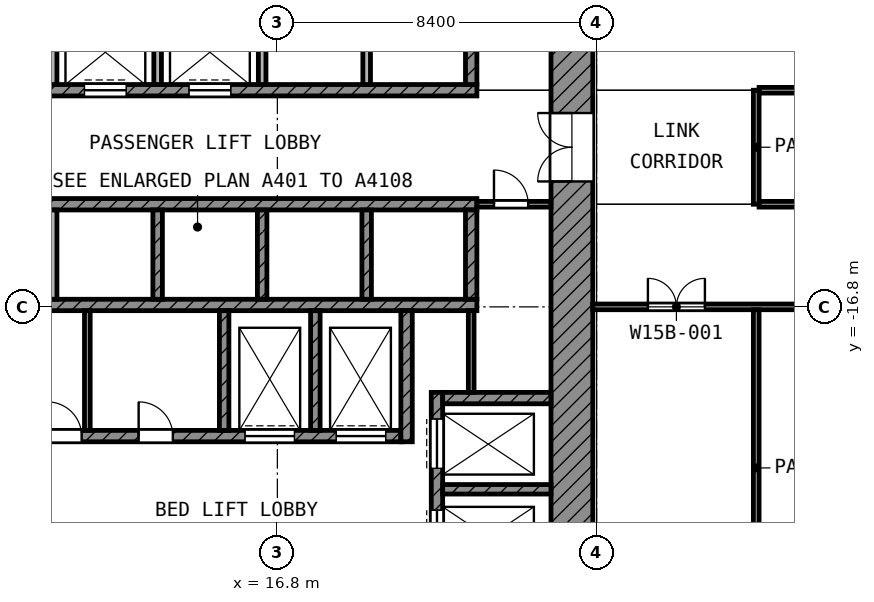
"""IFC4 building model, lengths in metres.
Left out: names, types, materials, properties, quantities, classifications, styles, units other than length and angle.
Written with IfcOpenShell. Run it as: python <this file> out.ifc"""

import sys

from ifc_helpers import new_model, si_unit, direction, frame, frame_2d, origin, place, context, subcontext, project, spatial, rectangle, extrude, element, fill, save


model = new_model("IFC4")
c1 = context("Model", 3, precision=1e-05, world=origin(), true_north=direction((0.0, 1.0)))
c2 = subcontext(c1, "Body", "Model", "MODEL_VIEW")
j1 = project(units=[si_unit("LENGTHUNIT", "METRE"), si_unit("PLANEANGLEUNIT", "RADIAN")], contexts=[c1])
p1 = place(None, origin())
s1 = spatial("IfcSite", under=j1, at=p1, CompositionType="ELEMENT")
p2 = place(p1, origin())
s2 = spatial("IfcBuilding", under=s1, at=p2, CompositionType="ELEMENT")
p3 = place(p2, frame((0.0, 0.0, 85.4)))
s3 = spatial("IfcBuildingStorey", under=s2, at=p3, CompositionType="ELEMENT", Elevation=85.4)
p4 = place(p3, frame((24.55, -24.0, 0.0), z_axis=(0.0, 0.0, 1.0), x_axis=(0.0, 1.0, 0.0)))
e1 = element("IfcWall", 1, at=p4, inside=s3, PredefinedType="SHEAR", context=c2, shape_type="SweptSolid", body=[
    extrude(rectangle(XDim=18.6, YDim=1.1, at=frame_2d((9.3, 0.0))), origin(), (0.0, 0.0, 1.0), 3.9),
])
p5 = place(p4, frame((10.5, 0.0, 0.0)))
e2 = element("IfcOpeningElement", 2, at=p5, cuts=e1, PredefinedType="OPENING", context=c2, shape_type="SweptSolid", body=[
    extrude(rectangle(XDim=1.8, YDim=2.1, at=frame_2d((0.9, 1.05))), frame((0.0, 0.56, 0.0), z_axis=(0.0, -1.0, 0.0), x_axis=(1.0, 0.0, 0.0)), (0.0, 0.0, 1.0), 1.12),
])
p6 = place(p3, frame((5.4, -11.1, 0.0), z_axis=(0.0, 0.0, 1.0), x_axis=(1.0, 0.0, 0.0)))
e3 = element("IfcWall", 3, at=p6, inside=s3, PredefinedType="SHEAR", context=c2, shape_type="SweptSolid", body=[
    extrude(rectangle(XDim=16.65, YDim=0.3, at=frame_2d((8.325, 0.0))), origin(), (0.0, 0.0, 1.0), 3.9),
])
p7 = place(p6, frame((0.825, 0.0, 0.0)))
e4 = element("IfcOpeningElement", 4, at=p7, cuts=e3, PredefinedType="OPENING", context=c2, shape_type="SweptSolid", body=[
    extrude(rectangle(XDim=1.1, YDim=2.1, at=frame_2d((0.55, 1.05))), frame((0.0, 0.16, 0.0), z_axis=(0.0, -1.0, 0.0), x_axis=(1.0, 0.0, 0.0)), (0.0, 0.0, 1.0), 0.32),
])
p8 = place(p6, frame((3.575, 0.0, 0.0)))
e5 = element("IfcOpeningElement", 5, at=p8, cuts=e3, PredefinedType="OPENING", context=c2, shape_type="SweptSolid", body=[
    extrude(rectangle(XDim=1.1, YDim=2.1, at=frame_2d((0.55, 1.05))), frame((0.0, 0.16, 0.0), z_axis=(0.0, -1.0, 0.0), x_axis=(1.0, 0.0, 0.0)), (0.0, 0.0, 1.0), 0.32),
])
p9 = place(p6, frame((6.325, 0.0, 0.0)))
e6 = element("IfcOpeningElement", 6, at=p9, cuts=e3, PredefinedType="OPENING", context=c2, shape_type="SweptSolid", body=[
    extrude(rectangle(XDim=1.1, YDim=2.1, at=frame_2d((0.55, 1.05))), frame((0.0, 0.16, 0.0), z_axis=(0.0, -1.0, 0.0), x_axis=(1.0, 0.0, 0.0)), (0.0, 0.0, 1.0), 0.32),
])
p10 = place(p6, frame((9.075, 0.0, 0.0)))
e7 = element("IfcOpeningElement", 7, at=p10, cuts=e3, PredefinedType="OPENING", context=c2, shape_type="SweptSolid", body=[
    extrude(rectangle(XDim=1.1, YDim=2.1, at=frame_2d((0.55, 1.05))), frame((0.0, 0.16, 0.0), z_axis=(0.0, -1.0, 0.0), x_axis=(1.0, 0.0, 0.0)), (0.0, 0.0, 1.0), 0.32),
])
for number, where, z_axis, x_axis in (
    (8, (5.4, -14.1, 0.0), (0.0, 0.0, 1.0), (1.0, 0.0, 0.0)),
    (9, (5.4, -16.75, 0.0), (0.0, 0.0, 1.0), (1.0, 0.0, 0.0)),
):
    element("IfcWall", number, at=place(p3, frame(where, z_axis=z_axis, x_axis=x_axis)), inside=s3, PredefinedType="SHEAR", context=c2, shape_type="SweptSolid", body=[
        extrude(rectangle(XDim=16.65, YDim=0.3, at=frame_2d((8.325, 0.0))), origin(), (0.0, 0.0, 1.0), 3.9),
    ])
p11 = place(p3, frame((5.4, -20.2, 0.0), z_axis=(0.0, 0.0, 1.0), x_axis=(1.0, 0.0, 0.0)))
e10 = element("IfcWall", 10, at=p11, inside=s3, PredefinedType="SHEAR", context=c2, shape_type="SweptSolid", body=[
    extrude(rectangle(XDim=14.65, YDim=0.3, at=frame_2d((7.325, 0.0))), origin(), (0.0, 0.0, 1.0), 3.9),
])
p12 = place(p11, frame((10.55, 0.0, 0.0)))
e11 = element("IfcOpeningElement", 11, at=p12, cuts=e10, PredefinedType="OPENING", context=c2, shape_type="SweptSolid", body=[
    extrude(rectangle(XDim=1.3, YDim=2.1, at=frame_2d((0.65, 1.05))), frame((0.0, 0.16, 0.0), z_axis=(0.0, -1.0, 0.0), x_axis=(1.0, 0.0, 0.0)), (0.0, 0.0, 1.0), 0.32),
])
p13 = place(p11, frame((12.95, 0.0, 0.0)))
e12 = element("IfcOpeningElement", 12, at=p13, cuts=e10, PredefinedType="OPENING", context=c2, shape_type="SweptSolid", body=[
    extrude(rectangle(XDim=1.3, YDim=2.1, at=frame_2d((0.65, 1.05))), frame((0.0, 0.16, 0.0), z_axis=(0.0, -1.0, 0.0), x_axis=(1.0, 0.0, 0.0)), (0.0, 0.0, 1.0), 0.32),
])
p14 = place(p11, frame((0.55, 0.0, 0.0)))
e13 = element("IfcOpeningElement", 13, at=p14, cuts=e10, PredefinedType="OPENING", context=c2, shape_type="SweptSolid", body=[
    extrude(rectangle(XDim=1.3, YDim=2.1, at=frame_2d((0.65, 1.05))), frame((0.0, 0.16, 0.0), z_axis=(0.0, -1.0, 0.0), x_axis=(1.0, 0.0, 0.0)), (0.0, 0.0, 1.0), 0.32),
])
p15 = place(p11, frame((2.95, 0.0, 0.0)))
e14 = element("IfcOpeningElement", 14, at=p15, cuts=e10, PredefinedType="OPENING", context=c2, shape_type="SweptSolid", body=[
    extrude(rectangle(XDim=1.3, YDim=2.1, at=frame_2d((0.65, 1.05))), frame((0.0, 0.16, 0.0), z_axis=(0.0, -1.0, 0.0), x_axis=(1.0, 0.0, 0.0)), (0.0, 0.0, 1.0), 0.32),
])
p16 = place(p11, frame((5.35, 0.0, 0.0)))
e15 = element("IfcOpeningElement", 15, at=p16, cuts=e10, PredefinedType="OPENING", context=c2, shape_type="SweptSolid", body=[
    extrude(rectangle(XDim=0.9, YDim=2.1, at=frame_2d((0.45, 1.05))), frame((0.0, 0.16, 0.0), z_axis=(0.0, -1.0, 0.0), x_axis=(1.0, 0.0, 0.0)), (0.0, 0.0, 1.0), 0.32),
])
p17 = place(p11, frame((7.75, 0.0, 0.0)))
e16 = element("IfcOpeningElement", 16, at=p17, cuts=e10, PredefinedType="OPENING", context=c2, shape_type="SweptSolid", body=[
    extrude(rectangle(XDim=0.9, YDim=2.1, at=frame_2d((0.45, 1.05))), frame((0.0, 0.16, 0.0), z_axis=(0.0, -1.0, 0.0), x_axis=(1.0, 0.0, 0.0)), (0.0, 0.0, 1.0), 0.32),
])
p18 = place(p3, frame((20.2, -20.35, 0.0), z_axis=(0.0, 0.0, 1.0), x_axis=(0.0, 1.0, 0.0)))
e17 = element("IfcWall", 17, at=p18, inside=s3, PredefinedType="SHEAR", context=c2, shape_type="SweptSolid", body=[
    extrude(rectangle(XDim=3.45, YDim=0.3, at=frame_2d((1.725, 0.0))), origin(), (0.0, 0.0, 1.0), 3.9),
])
p19 = place(p3, frame((21.9, -10.95, 0.0), z_axis=(0.0, 0.0, 1.0), x_axis=(0.0, 1.0, 0.0)))
e18 = element("IfcWall", 18, at=p19, inside=s3, PredefinedType="SHEAR", context=c2, shape_type="SweptSolid", body=[
    extrude(rectangle(XDim=2.35, YDim=0.3, at=frame_2d((1.175, 0.0))), origin(), (0.0, 0.0, 1.0), 3.9),
])
p20 = place(p3, frame((21.9, -16.6, 0.0), z_axis=(0.0, 0.0, 1.0), x_axis=(0.0, 1.0, 0.0)))
e19 = element("IfcWall", 19, at=p20, inside=s3, PredefinedType="SHEAR", context=c2, shape_type="SweptSolid", body=[
    extrude(rectangle(XDim=2.35, YDim=0.3, at=frame_2d((1.175, 0.0))), origin(), (0.0, 0.0, 1.0), 3.9),
])
p21 = place(p3, frame((21.15, -19.2, 0.0), z_axis=(0.0, 0.0, 1.0), x_axis=(1.0, 0.0, 0.0)))
e20 = element("IfcWall", 20, at=p21, inside=s3, PredefinedType="SHEAR", context=c2, shape_type="SweptSolid", body=[
    extrude(rectangle(XDim=2.85, YDim=0.3, at=frame_2d((1.425, 0.0))), origin(), (0.0, 0.0, 1.0), 3.9),
])
p22 = place(p3, frame((21.0, -24.0, 0.0), z_axis=(0.0, 0.0, 1.0), x_axis=(0.0, 1.0, 0.0)))
e21 = element("IfcWall", 21, at=p22, inside=s3, PredefinedType="SHEAR", context=c2, shape_type="SweptSolid", body=[
    extrude(rectangle(XDim=4.95, YDim=0.3, at=frame_2d((2.475, 0.0))), origin(), (0.0, 0.0, 1.0), 3.9),
])
p23 = place(p22, frame((2.95, 0.0, 0.0)))
e22 = element("IfcOpeningElement", 22, at=p23, cuts=e21, PredefinedType="OPENING", context=c2, shape_type="SweptSolid", body=[
    extrude(rectangle(XDim=1.3, YDim=2.1, at=frame_2d((0.65, 1.05))), frame((0.0, 0.16, 0.0), z_axis=(0.0, -1.0, 0.0), x_axis=(1.0, 0.0, 0.0)), (0.0, 0.0, 1.0), 0.32),
])
p24 = place(p22, frame((0.55, 0.0, 0.0)))
e23 = element("IfcOpeningElement", 23, at=p24, cuts=e21, PredefinedType="OPENING", context=c2, shape_type="SweptSolid", body=[
    extrude(rectangle(XDim=1.3, YDim=2.1, at=frame_2d((0.65, 1.05))), frame((0.0, 0.16, 0.0), z_axis=(0.0, -1.0, 0.0), x_axis=(1.0, 0.0, 0.0)), (0.0, 0.0, 1.0), 0.32),
])
p25 = place(p3, frame((21.15, -21.6, 0.0), z_axis=(0.0, 0.0, 1.0), x_axis=(1.0, 0.0, 0.0)))
e24 = element("IfcWall", 24, at=p25, inside=s3, PredefinedType="SHEAR", context=c2, shape_type="SweptSolid", body=[
    extrude(rectangle(XDim=2.85, YDim=0.25, at=frame_2d((1.425, 0.0))), origin(), (0.0, 0.0, 1.0), 3.9),
])
for number, where, z_axis, x_axis in (
    (25, (15.4, -20.05, 0.0), (0.0, 0.0, 1.0), (0.0, 1.0, 0.0)),
    (26, (17.8, -20.05, 0.0), (0.0, 0.0, 1.0), (0.0, 1.0, 0.0)),
):
    element("IfcWall", number, at=place(p3, frame(where, z_axis=z_axis, x_axis=x_axis)), inside=s3, PredefinedType="SHEAR", context=c2, shape_type="SweptSolid", body=[
        extrude(rectangle(XDim=3.15, YDim=0.25, at=frame_2d((1.575, 0.0))), origin(), (0.0, 0.0, 1.0), 3.9),
    ])
for number, where, z_axis, x_axis in (
    (27, (10.9, -10.95, 0.0), (0.0, 0.0, 1.0), (0.0, 1.0, 0.0)),
    (28, (13.65, -10.95, 0.0), (0.0, 0.0, 1.0), (0.0, 1.0, 0.0)),
    (29, (16.4, -10.95, 0.0), (0.0, 0.0, 1.0), (0.0, 1.0, 0.0)),
    (30, (19.15, -10.95, 0.0), (0.0, 0.0, 1.0), (0.0, 1.0, 0.0)),
):
    element("IfcWall", number, at=place(p3, frame(where, z_axis=z_axis, x_axis=x_axis)), inside=s3, PredefinedType="PARTITIONING", context=c2, shape_type="SweptSolid", body=[
        extrude(rectangle(XDim=2.35, YDim=0.2, at=frame_2d((1.175, 0.0))), origin(), (0.0, 0.0, 1.0), 3.9),
    ])
p26 = place(p3, frame((10.9, -16.6, 0.0), z_axis=(0.0, 0.0, 1.0), x_axis=(0.0, 1.0, 0.0)))
e31 = element("IfcWall", 31, at=p26, inside=s3, PredefinedType="PARTITIONING", context=c2, shape_type="SweptSolid", body=[
    extrude(rectangle(XDim=2.35, YDim=0.2, at=frame_2d((1.175, 0.0))), origin(), (0.0, 0.0, 1.0), 3.9),
])
for number, where, z_axis, x_axis in (
    (32, (13.65, -16.6, 0.0), (0.0, 0.0, 1.0), (0.0, 1.0, 0.0)),
    (33, (16.4, -16.6, 0.0), (0.0, 0.0, 1.0), (0.0, 1.0, 0.0)),
    (34, (19.15, -16.6, 0.0), (0.0, 0.0, 1.0), (0.0, 1.0, 0.0)),
):
    element("IfcWall", number, at=place(p3, frame(where, z_axis=z_axis, x_axis=x_axis)), inside=s3, PredefinedType="SHEAR", context=c2, shape_type="SweptSolid", body=[
        extrude(rectangle(XDim=2.35, YDim=0.25, at=frame_2d((1.175, 0.0))), origin(), (0.0, 0.0, 1.0), 3.9),
    ])
p27 = place(p3, frame((21.9, -19.05, 0.0), z_axis=(0.0, 0.0, 1.0), x_axis=(0.0, 1.0, 0.0)))
e35 = element("IfcWall", 35, at=p27, inside=s3, PredefinedType="PARTITIONING", context=c2, shape_type="SweptSolid", body=[
    extrude(rectangle(XDim=2.15, YDim=0.15, at=frame_2d((1.075, 0.0))), origin(), (0.0, 0.0, 1.0), 3.9),
])
p28 = place(p3, frame((22.05, -14.1, 0.0), z_axis=(0.0, 0.0, 1.0), x_axis=(1.0, 0.0, 0.0)))
e36 = element("IfcWall", 36, at=p28, inside=s3, PredefinedType="PARTITIONING", context=c2, shape_type="SweptSolid", body=[
    extrude(rectangle(XDim=1.95, YDim=0.15, at=frame_2d((0.975, 0.0))), origin(), (0.0, 0.0, 1.0), 3.9),
])
p29 = place(p28, frame((0.45, 0.0, 0.0)))
e37 = element("IfcOpeningElement", 37, at=p29, cuts=e36, PredefinedType="OPENING", context=c2, shape_type="SweptSolid", body=[
    extrude(rectangle(XDim=0.9, YDim=2.1, at=frame_2d((0.45, 1.05))), frame((0.0, 0.085, 0.0), z_axis=(0.0, -1.0, 0.0), x_axis=(1.0, 0.0, 0.0)), (0.0, 0.0, 1.0), 0.17),
])
p30 = place(p3, frame((11.8, -20.05, 0.0), z_axis=(0.0, 0.0, 1.0), x_axis=(0.0, 1.0, 0.0)))
e38 = element("IfcWall", 38, at=p30, inside=s3, PredefinedType="PARTITIONING", context=c2, shape_type="SweptSolid", body=[
    extrude(rectangle(XDim=3.15, YDim=0.15, at=frame_2d((1.575, 0.0))), origin(), (0.0, 0.0, 1.0), 3.9),
])
p31 = place(p3, frame((25.1, -16.8, 0.0), z_axis=(0.0, 0.0, 1.0), x_axis=(1.0, 0.0, 0.0)))
e39 = element("IfcWall", 39, at=p31, inside=s3, PredefinedType="PARTITIONING", context=c2, shape_type="SweptSolid", body=[
    extrude(rectangle(XDim=24.65, YDim=0.15, at=frame_2d((12.325, 0.0))), origin(), (0.0, 0.0, 1.0), 3.9),
])
p32 = place(p31, frame((1.45, 0.0, 0.0)))
e40 = element("IfcOpeningElement", 40, at=p32, cuts=e39, PredefinedType="OPENING", context=c2, shape_type="SweptSolid", body=[
    extrude(rectangle(XDim=1.5, YDim=2.1, at=frame_2d((0.75, 1.05))), frame((0.0, 0.085, 0.0), z_axis=(0.0, -1.0, 0.0), x_axis=(1.0, 0.0, 0.0)), (0.0, 0.0, 1.0), 0.17),
])
p33 = place(p31, frame((9.25, 0.0, 0.0)))
e41 = element("IfcOpeningElement", 41, at=p33, cuts=e39, PredefinedType="OPENING", context=c2, shape_type="SweptSolid", body=[
    extrude(rectangle(XDim=1.5, YDim=2.1, at=frame_2d((0.75, 1.05))), frame((0.0, 0.085, 0.0), z_axis=(0.0, -1.0, 0.0), x_axis=(1.0, 0.0, 0.0)), (0.0, 0.0, 1.0), 0.17),
])
p34 = place(p31, frame((15.0, 0.0, 0.0)))
e42 = element("IfcOpeningElement", 42, at=p34, cuts=e39, PredefinedType="OPENING", context=c2, shape_type="SweptSolid", body=[
    extrude(rectangle(XDim=1.2, YDim=2.1, at=frame_2d((0.6, 1.05))), frame((0.0, 0.085, 0.0), z_axis=(0.0, -1.0, 0.0), x_axis=(1.0, 0.0, 0.0)), (0.0, 0.0, 1.0), 0.17),
])
p35 = place(p31, frame((22.967, 0.0, 0.0)))
e43 = element("IfcOpeningElement", 43, at=p35, cuts=e39, PredefinedType="OPENING", context=c2, shape_type="SweptSolid", body=[
    extrude(rectangle(XDim=1.2, YDim=2.1, at=frame_2d((0.6, 1.05))), frame((0.0, 0.085, 0.0), z_axis=(0.0, -1.0, 0.0), x_axis=(1.0, 0.0, 0.0)), (0.0, 0.0, 1.0), 0.17),
])
p36 = place(p31, frame((17.6, 0.0, 0.0)))
e44 = element("IfcOpeningElement", 44, at=p36, cuts=e39, PredefinedType="OPENING", context=c2, shape_type="SweptSolid", body=[
    extrude(rectangle(XDim=1.2, YDim=2.1, at=frame_2d((0.6, 1.05))), frame((0.0, 0.085, 0.0), z_axis=(0.0, -1.0, 0.0), x_axis=(1.0, 0.0, 0.0)), (0.0, 0.0, 1.0), 0.17),
])
p37 = place(p3, frame((29.475, -14.1, 0.0), z_axis=(0.0, 0.0, 1.0), x_axis=(1.0, 0.0, 0.0)))
e45 = element("IfcWall", 45, at=p37, inside=s3, PredefinedType="PARTITIONING", context=c2, shape_type="SweptSolid", body=[
    extrude(rectangle(XDim=47.55, YDim=0.15, at=frame_2d((23.775, 0.0))), origin(), (0.0, 0.0, 1.0), 3.9),
])
p38 = place(p37, frame((18.625, 0.0, 0.0)))
e46 = element("IfcOpeningElement", 46, at=p38, cuts=e45, PredefinedType="OPENING", context=c2, shape_type="SweptSolid", body=[
    extrude(rectangle(XDim=1.0, YDim=2.1, at=frame_2d((0.5, 1.05))), frame((0.0, 0.085, 0.0), z_axis=(0.0, -1.0, 0.0), x_axis=(1.0, 0.0, 0.0)), (0.0, 0.0, 1.0), 0.17),
])
p39 = place(p37, frame((42.175, 0.0, 0.0)))
e47 = element("IfcOpeningElement", 47, at=p39, cuts=e45, PredefinedType="OPENING", context=c2, shape_type="SweptSolid", body=[
    extrude(rectangle(XDim=1.0, YDim=2.1, at=frame_2d((0.5, 1.05))), frame((0.0, 0.085, 0.0), z_axis=(0.0, -1.0, 0.0), x_axis=(1.0, 0.0, 0.0)), (0.0, 0.0, 1.0), 0.17),
])
p40 = place(p3, frame((29.475, -11.1, 0.0), z_axis=(0.0, 0.0, 1.0), x_axis=(1.0, 0.0, 0.0)))
e48 = element("IfcWall", 48, at=p40, inside=s3, PredefinedType="PARTITIONING", context=c2, shape_type="SweptSolid", body=[
    extrude(rectangle(XDim=47.55, YDim=0.15, at=frame_2d((23.775, 0.0))), origin(), (0.0, 0.0, 1.0), 3.9),
])
p41 = place(p40, frame((3.525, 0.0, 0.0)))
e49 = element("IfcOpeningElement", 49, at=p41, cuts=e48, PredefinedType="OPENING", context=c2, shape_type="SweptSolid", body=[
    extrude(rectangle(XDim=1.2, YDim=2.1, at=frame_2d((0.6, 1.05))), frame((0.0, 0.085, 0.0), z_axis=(0.0, -1.0, 0.0), x_axis=(1.0, 0.0, 0.0)), (0.0, 0.0, 1.0), 0.17),
])
p42 = place(p40, frame((9.925, 0.0, 0.0)))
e50 = element("IfcOpeningElement", 50, at=p42, cuts=e48, PredefinedType="OPENING", context=c2, shape_type="SweptSolid", body=[
    extrude(rectangle(XDim=1.0, YDim=2.1, at=frame_2d((0.5, 1.05))), frame((0.0, 0.085, 0.0), z_axis=(0.0, -1.0, 0.0), x_axis=(1.0, 0.0, 0.0)), (0.0, 0.0, 1.0), 0.17),
])
p43 = place(p40, frame((14.425, 0.0, 0.0)))
e51 = element("IfcOpeningElement", 51, at=p43, cuts=e48, PredefinedType="OPENING", context=c2, shape_type="SweptSolid", body=[
    extrude(rectangle(XDim=1.0, YDim=2.1, at=frame_2d((0.5, 1.05))), frame((0.0, 0.085, 0.0), z_axis=(0.0, -1.0, 0.0), x_axis=(1.0, 0.0, 0.0)), (0.0, 0.0, 1.0), 0.17),
])
p44 = place(p40, frame((28.825, 0.0, 0.0)))
e52 = element("IfcOpeningElement", 52, at=p44, cuts=e48, PredefinedType="OPENING", context=c2, shape_type="SweptSolid", body=[
    extrude(rectangle(XDim=1.0, YDim=2.1, at=frame_2d((0.5, 1.05))), frame((0.0, 0.085, 0.0), z_axis=(0.0, -1.0, 0.0), x_axis=(1.0, 0.0, 0.0)), (0.0, 0.0, 1.0), 0.17),
])
p45 = place(p3, frame((29.4, -25.2, 0.0), z_axis=(0.0, 0.0, 1.0), x_axis=(0.0, 1.0, 0.0)))
e53 = element("IfcWall", 53, at=p45, inside=s3, PredefinedType="PARTITIONING", context=c2, shape_type="SweptSolid", body=[
    extrude(rectangle(XDim=8.325, YDim=0.15, at=frame_2d((4.163, 0.0))), origin(), (0.0, 0.0, 1.0), 3.9),
])
p46 = place(p3, frame((29.4, -14.1, 0.0), z_axis=(0.0, 0.0, 1.0), x_axis=(0.0, 1.0, 0.0)))
e54 = element("IfcWall", 54, at=p46, inside=s3, PredefinedType="PARTITIONING", context=c2, shape_type="SweptSolid", body=[
    extrude(rectangle(XDim=3.0, YDim=0.15, at=frame_2d((1.5, 0.0))), origin(), (0.0, 0.0, 1.0), 3.9),
])
p47 = place(p9, origin())
e55 = element("IfcDoor", 55, at=p47, inside=s3, OperationType="DOUBLE_DOOR_SLIDING", PredefinedType="DOOR", context=c2, shape_type="SweptSolid", body=[
    extrude(rectangle(XDim=1.1, YDim=2.1, at=frame_2d((0.55, 1.05))), frame((0.0, 0.025, 0.0), z_axis=(0.0, -1.0, 0.0), x_axis=(1.0, 0.0, 0.0)), (0.0, 0.0, 1.0), 0.05),
])
fill(e6, e55)
p48 = place(p10, origin())
e56 = element("IfcDoor", 56, at=p48, inside=s3, OperationType="DOUBLE_DOOR_SLIDING", PredefinedType="DOOR", context=c2, shape_type="SweptSolid", body=[
    extrude(rectangle(XDim=1.1, YDim=2.1, at=frame_2d((0.55, 1.05))), frame((0.0, 0.025, 0.0), z_axis=(0.0, -1.0, 0.0), x_axis=(1.0, 0.0, 0.0)), (0.0, 0.0, 1.0), 0.05),
])
fill(e7, e56)
p49 = place(p23, origin())
e57 = element("IfcDoor", 57, at=p49, inside=s3, OperationType="DOUBLE_DOOR_SLIDING", PredefinedType="DOOR", context=c2, shape_type="SweptSolid", body=[
    extrude(rectangle(XDim=1.3, YDim=2.1, at=frame_2d((0.65, 1.05))), frame((0.0, 0.025, 0.0), z_axis=(0.0, -1.0, 0.0), x_axis=(1.0, 0.0, 0.0)), (0.0, 0.0, 1.0), 0.05),
])
fill(e22, e57)
p50 = place(p24, origin())
e58 = element("IfcDoor", 58, at=p50, inside=s3, OperationType="DOUBLE_DOOR_SLIDING", PredefinedType="DOOR", context=c2, shape_type="SweptSolid", body=[
    extrude(rectangle(XDim=1.3, YDim=2.1, at=frame_2d((0.65, 1.05))), frame((0.0, 0.025, 0.0), z_axis=(0.0, -1.0, 0.0), x_axis=(1.0, 0.0, 0.0)), (0.0, 0.0, 1.0), 0.05),
])
fill(e23, e58)
p51 = place(p12, origin())
e59 = element("IfcDoor", 59, at=p51, inside=s3, OperationType="DOUBLE_DOOR_SLIDING", PredefinedType="DOOR", context=c2, shape_type="SweptSolid", body=[
    extrude(rectangle(XDim=1.3, YDim=2.1, at=frame_2d((0.65, 1.05))), frame((0.0, 0.025, 0.0), z_axis=(0.0, -1.0, 0.0), x_axis=(1.0, 0.0, 0.0)), (0.0, 0.0, 1.0), 0.05),
])
fill(e11, e59)
p52 = place(p13, origin())
e60 = element("IfcDoor", 60, at=p52, inside=s3, OperationType="DOUBLE_DOOR_SLIDING", PredefinedType="DOOR", context=c2, shape_type="SweptSolid", body=[
    extrude(rectangle(XDim=1.3, YDim=2.1, at=frame_2d((0.65, 1.05))), frame((0.0, 0.025, 0.0), z_axis=(0.0, -1.0, 0.0), x_axis=(1.0, 0.0, 0.0)), (0.0, 0.0, 1.0), 0.05),
])
fill(e12, e60)
p53 = place(p5, origin())
e61 = element("IfcDoor", 61, at=p53, inside=s3, OperationType="DOUBLE_DOOR_SINGLE_SWING", PredefinedType="DOOR", context=c2, shape_type="SweptSolid", body=[
    extrude(rectangle(XDim=1.8, YDim=2.1, at=frame_2d((0.9, 1.05))), frame((0.0, 0.025, 0.0), z_axis=(0.0, -1.0, 0.0), x_axis=(1.0, 0.0, 0.0)), (0.0, 0.0, 1.0), 0.05),
])
fill(e2, e61)
p54 = place(p29, origin())
e62 = element("IfcDoor", 62, at=p54, inside=s3, OperationType="SINGLE_SWING_LEFT", PredefinedType="DOOR", context=c2, shape_type="SweptSolid", body=[
    extrude(rectangle(XDim=0.9, YDim=2.1, at=frame_2d((0.45, 1.05))), frame((0.0, 0.025, 0.0), z_axis=(0.0, -1.0, 0.0), x_axis=(1.0, 0.0, 0.0)), (0.0, 0.0, 1.0), 0.05),
])
fill(e37, e62)
p55 = place(p16, origin())
e63 = element("IfcDoor", 63, at=p55, inside=s3, OperationType="SINGLE_SWING_LEFT", PredefinedType="DOOR", context=c2, shape_type="SweptSolid", body=[
    extrude(rectangle(XDim=0.9, YDim=2.1, at=frame_2d((0.45, 1.05))), frame((0.0, 0.025, 0.0), z_axis=(0.0, -1.0, 0.0), x_axis=(1.0, 0.0, 0.0)), (0.0, 0.0, 1.0), 0.05),
])
fill(e15, e63)
p56 = place(p17, origin())
e64 = element("IfcDoor", 64, at=p56, inside=s3, OperationType="SINGLE_SWING_LEFT", PredefinedType="DOOR", context=c2, shape_type="SweptSolid", body=[
    extrude(rectangle(XDim=0.9, YDim=2.1, at=frame_2d((0.45, 1.05))), frame((0.0, 0.025, 0.0), z_axis=(0.0, -1.0, 0.0), x_axis=(1.0, 0.0, 0.0)), (0.0, 0.0, 1.0), 0.05),
])
fill(e16, e64)
p57 = place(p32, origin())
e65 = element("IfcDoor", 65, at=p57, inside=s3, OperationType="DOUBLE_DOOR_SINGLE_SWING", PredefinedType="DOOR", context=c2, shape_type="SweptSolid", body=[
    extrude(rectangle(XDim=1.5, YDim=2.1, at=frame_2d((0.75, 1.05))), frame((0.0, 0.025, 0.0), z_axis=(0.0, -1.0, 0.0), x_axis=(1.0, 0.0, 0.0)), (0.0, 0.0, 1.0), 0.05),
])
fill(e40, e65)
save(model, sys.argv[1])
